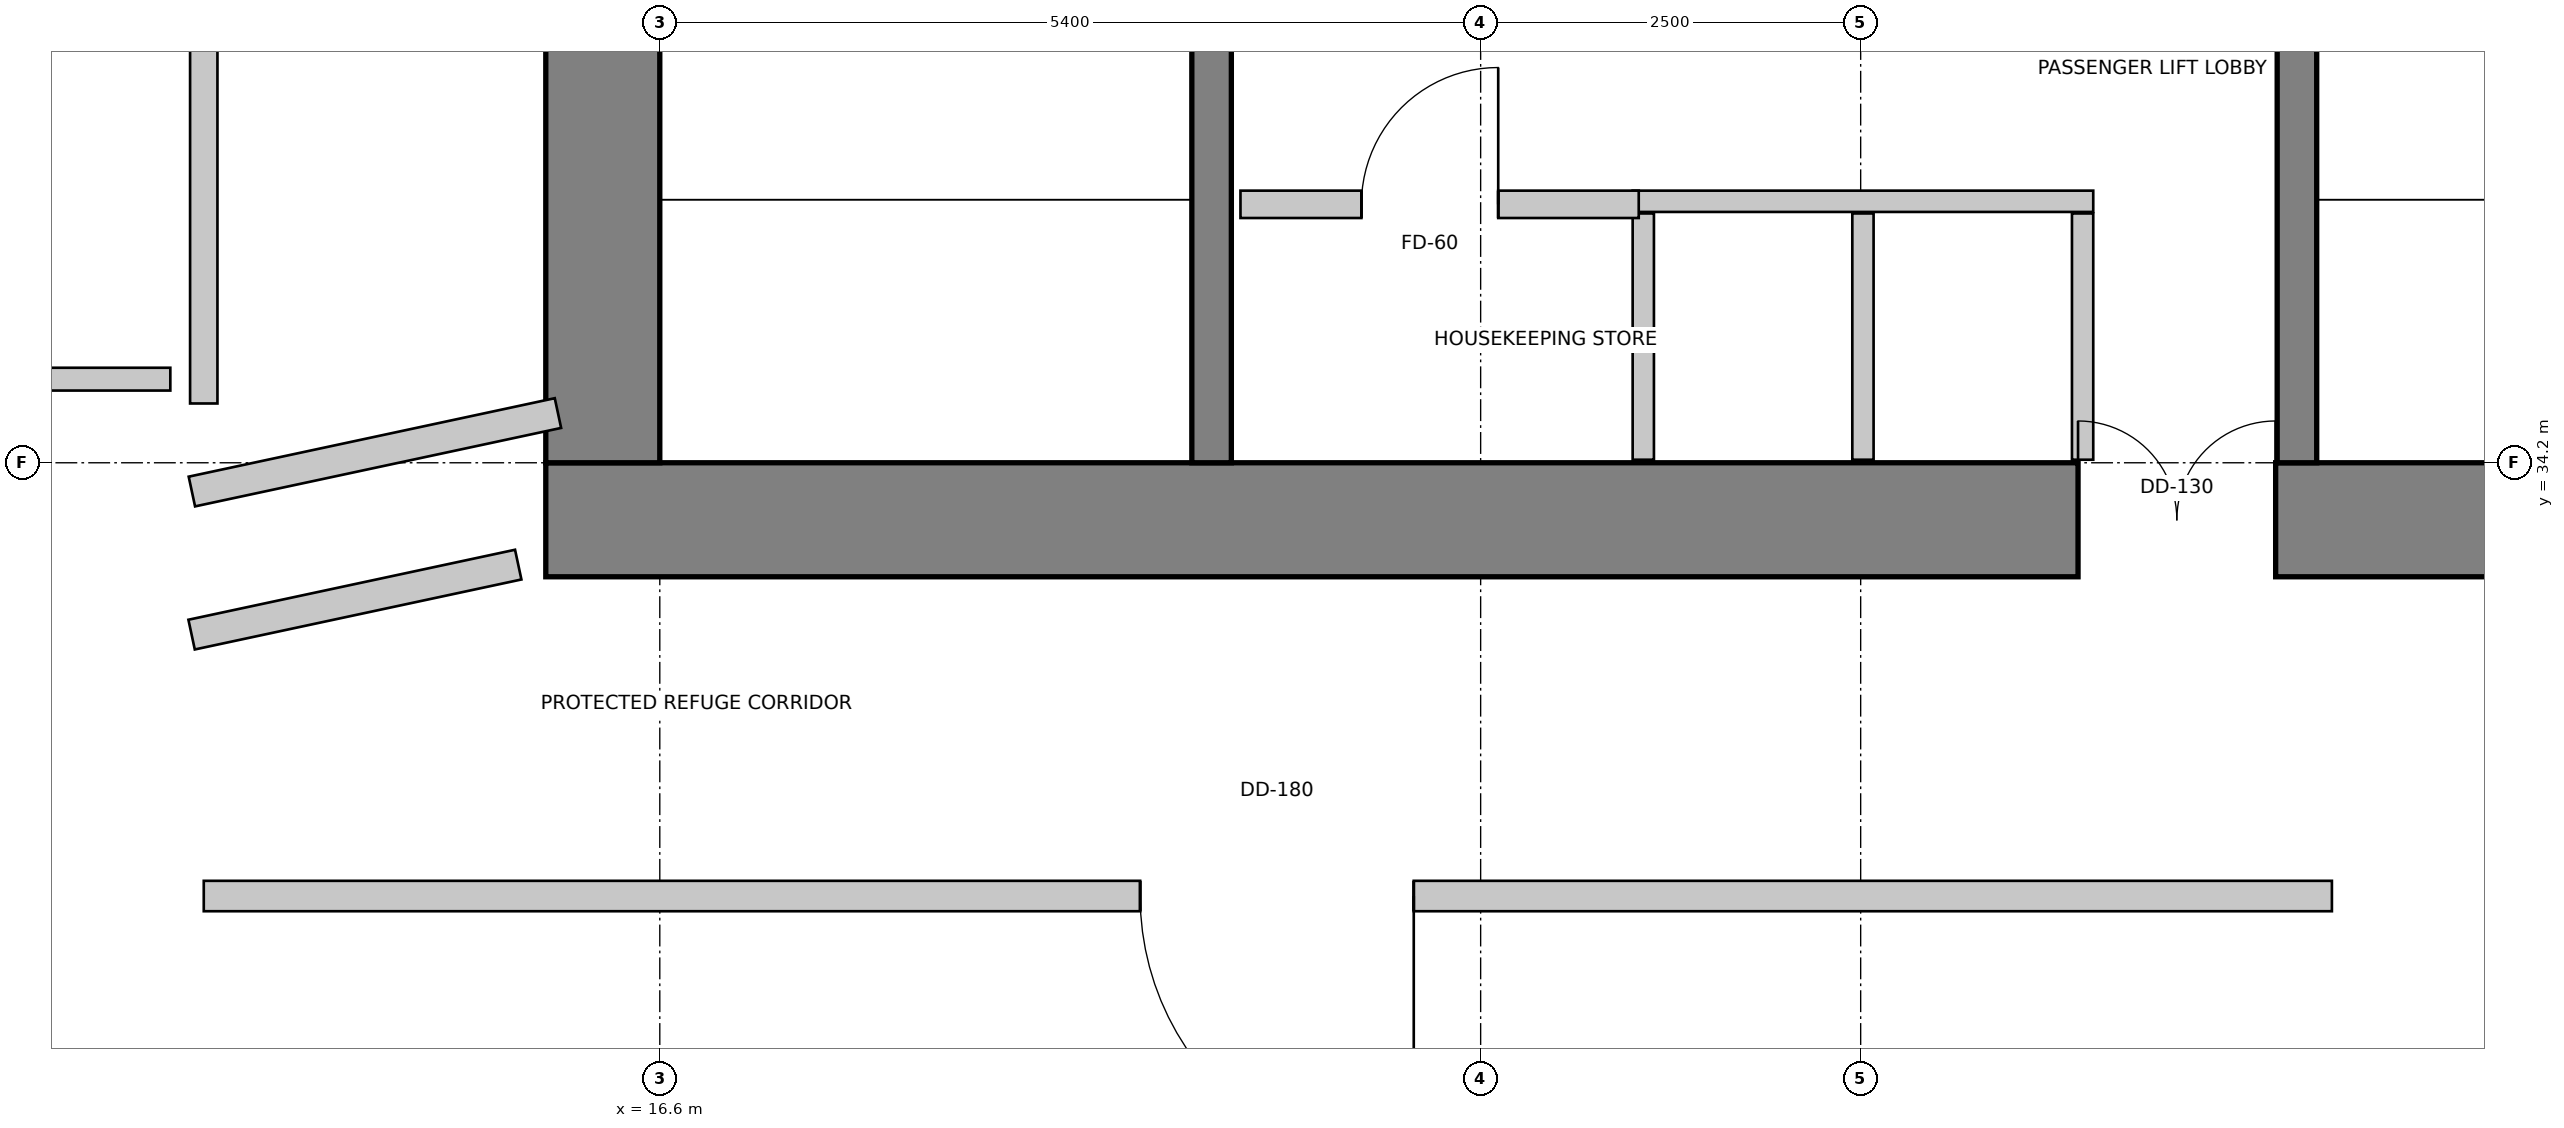
"""IFC4 building model, lengths in metres.
Left out: names, types, materials, properties, quantities, classifications, styles, units other than length and angle.
Written with IfcOpenShell. Run it as: python <this file> out.ifc"""

import sys

from ifc_helpers import new_model, si_unit, direction, frame, frame_2d, origin, place, context, subcontext, project, spatial, rectangle, extrude, source, transform, mapped, element, fill, save


model = new_model("IFC4")
c1 = context("Model", 3, precision=1e-05, world=origin(), true_north=direction((0.0, 1.0)))
c2 = subcontext(c1, "Body", "Model", "MODEL_VIEW")
j1 = project(units=[si_unit("LENGTHUNIT", "METRE"), si_unit("PLANEANGLEUNIT", "RADIAN")], contexts=[c1])
p1 = place(None, origin())
s1 = spatial("IfcSite", under=j1, at=p1, CompositionType="ELEMENT")
p2 = place(p1, origin())
s2 = spatial("IfcBuilding", under=s1, at=p2, CompositionType="ELEMENT")
p3 = place(p2, frame((0.0, 0.0, 171.8)))
s3 = spatial("IfcBuildingStorey", under=s2, at=p3, CompositionType="ELEMENT", Elevation=171.8)
p4 = place(p3, frame((15.85, 33.825, 0.0), z_axis=(0.0, 0.0, 1.0), x_axis=(1.0, 0.0, 0.0)))
e1 = element("IfcWall", 1, at=p4, inside=s3, PredefinedType="SHEAR", context=c2, shape_type="SweptSolid", body=[
    extrude(rectangle(XDim=15.9, YDim=0.75, at=frame_2d((7.95, 0.0))), origin(), (0.0, 0.0, 1.0), 6.4),
])
m1 = source(origin(), c2, "Body", "SweptSolid", [
    extrude(rectangle(XDim=1.3, YDim=2.15, at=frame_2d((0.65, 1.075))), frame((0.0, 0.385, 0.0), z_axis=(0.0, -1.0, 0.0), x_axis=(1.0, 0.0, 0.0)), (0.0, 0.0, 1.0), 0.77),
])
p5 = place(p4, frame((10.08, 0.0, 0.0)))
e2 = element("IfcOpeningElement", 2, at=p5, cuts=e1, PredefinedType="OPENING", context=c2, shape_type="MappedRepresentation", body=[
    mapped(m1, transform((0.0, 0.0, 0.0), scale=1.0)),
])
p6 = place(p3, frame((16.225, 34.2, 0.0), z_axis=(0.0, 0.0, 1.0), x_axis=(0.0, 1.0, 0.0)))
e3 = element("IfcWall", 3, at=p6, inside=s3, PredefinedType="SHEAR", context=c2, shape_type="SweptSolid", body=[
    extrude(rectangle(XDim=11.4, YDim=0.75, at=frame_2d((5.7, 0.0))), origin(), (0.0, 0.0, 1.0), 6.4),
])
m2 = source(origin(), c2, "Body", "SweptSolid", [
    extrude(rectangle(XDim=1.1, YDim=2.15, at=frame_2d((0.55, 1.075))), frame((0.0, 0.385, 0.0), z_axis=(0.0, -1.0, 0.0), x_axis=(1.0, 0.0, 0.0)), (0.0, 0.0, 1.0), 0.77),
])
p7 = place(p6, frame((7.15, 0.0, 0.0)))
e4 = element("IfcOpeningElement", 4, at=p7, cuts=e3, PredefinedType="OPENING", context=c2, shape_type="MappedRepresentation", body=[
    mapped(m2, transform((0.0, 0.0, 0.0), scale=1.0)),
])
p8 = place(p3, frame((20.23, 34.2, 0.0), z_axis=(0.0, 0.0, 1.0), x_axis=(0.0, 1.0, 0.0)))
e5 = element("IfcWall", 5, at=p8, inside=s3, PredefinedType="SHEAR", context=c2, shape_type="SweptSolid", body=[
    extrude(rectangle(XDim=9.06, YDim=0.26, at=frame_2d((4.53, 0.0))), origin(), (0.0, 0.0, 1.0), 6.4),
])
m3 = source(origin(), c2, "Body", "SweptSolid", [
    extrude(rectangle(XDim=1.1, YDim=2.15, at=frame_2d((0.55, 1.075))), frame((0.0, 0.14, 0.0), z_axis=(0.0, -1.0, 0.0), x_axis=(1.0, 0.0, 0.0)), (0.0, 0.0, 1.0), 0.28),
])
p9 = place(p8, frame((7.45, 0.0, 0.0)))
e6 = element("IfcOpeningElement", 6, at=p9, cuts=e5, PredefinedType="OPENING", context=c2, shape_type="MappedRepresentation", body=[
    mapped(m3, transform((0.0, 0.0, 0.0), scale=1.0)),
])
p10 = place(p3, frame((27.37, 34.2, 0.0), z_axis=(0.0, 0.0, 1.0), x_axis=(0.0, 1.0, 0.0)))
e7 = element("IfcWall", 7, at=p10, inside=s3, PredefinedType="SHEAR", context=c2, shape_type="SweptSolid", body=[
    extrude(rectangle(XDim=9.06, YDim=0.26, at=frame_2d((4.53, 0.0))), origin(), (0.0, 0.0, 1.0), 6.4),
])
p11 = place(p10, frame((7.45, 0.0, 0.0)))
e8 = element("IfcOpeningElement", 8, at=p11, cuts=e7, PredefinedType="OPENING", context=c2, shape_type="MappedRepresentation", body=[
    mapped(m3, transform((0.0, 0.0, 0.0), scale=1.0)),
])
p12 = place(p3, frame((28.084, 28.76, 0.0), z_axis=(0.0, 0.0, 1.0), x_axis=(0.707106781187, 0.707106781187, 0.0)))
e9 = element("IfcWall", 9, at=p12, inside=s3, PredefinedType="PARAPET", context=c2, shape_type="SweptSolid", body=[
    extrude(rectangle(XDim=2.653, YDim=0.22, at=frame_2d((1.326, 0.0))), origin(), (0.0, 0.0, 1.0), 1.1),
])
p13 = place(p3, frame((13.277, 47.16, 0.0), z_axis=(0.0, 0.0, 1.0), x_axis=(-0.31991959002, -0.947444698081, 0.0)))
e10 = element("IfcWall", 10, at=p13, inside=s3, PredefinedType="PARAPET", context=c2, shape_type="SweptSolid", body=[
    extrude(rectangle(XDim=15.861, YDim=0.22, at=frame_2d((7.93, 0.0))), origin(), (0.0, 0.0, 1.0), 1.1),
])
p14 = place(p3, frame((23.0, 35.92, 0.0), z_axis=(0.0, 0.0, 1.0), x_axis=(1.0, 0.0, 0.0)))
e11 = element("IfcWall", 11, at=p14, inside=s3, PredefinedType="SOLIDWALL", context=c2, shape_type="SweptSolid", body=[
    extrude(rectangle(XDim=3.03, YDim=0.14, at=frame_2d((1.515, 0.0))), origin(), (0.0, 0.0, 1.0), 6.1),
])
for number, where, z_axis, x_axis in (
    (12, (25.96, 34.22, 0.0), (0.0, 0.0, 1.0), (0.0, 1.0, 0.0)),
    (13, (23.07, 34.22, 0.0), (0.0, 0.0, 1.0), (0.0, 1.0, 0.0)),
    (14, (24.515, 34.22, 0.0), (0.0, 0.0, 1.0), (0.0, 1.0, 0.0)),
):
    element("IfcWall", number, at=place(p3, frame(where, z_axis=z_axis, x_axis=x_axis)), inside=s3, PredefinedType="SOLIDWALL", context=c2, shape_type="SweptSolid", body=[
        extrude(rectangle(XDim=1.62, YDim=0.14, at=frame_2d((0.81, 0.0))), origin(), (0.0, 0.0, 1.0), 5.392),
    ])
p15 = place(p3, frame((20.42, 35.9, 0.0), z_axis=(0.0, 0.0, 1.0), x_axis=(1.0, 0.0, 0.0)))
e15 = element("IfcWall", 15, at=p15, inside=s3, PredefinedType="PARTITIONING", context=c2, shape_type="SweptSolid", body=[
    extrude(rectangle(XDim=2.62, YDim=0.18, at=frame_2d((1.31, 0.0))), origin(), (0.0, 0.0, 1.0), 6.1),
])
m4 = source(origin(), c2, "Body", "SweptSolid", [
    extrude(rectangle(XDim=0.9, YDim=2.15, at=frame_2d((0.45, 1.075))), frame((0.0, 0.1, 0.0), z_axis=(0.0, -1.0, 0.0), x_axis=(1.0, 0.0, 0.0)), (0.0, 0.0, 1.0), 0.2),
])
p16 = place(p15, frame((0.796, 0.0, 0.0)))
e16 = element("IfcOpeningElement", 16, at=p16, cuts=e15, PredefinedType="OPENING", context=c2, shape_type="MappedRepresentation", body=[
    mapped(m4, transform((0.0, 0.0, 0.0), scale=1.0)),
])
p17 = place(p3, frame((27.6, 31.35, 0.0), z_axis=(0.0, 0.0, 1.0), x_axis=(-1.0, 0.0, 0.0)))
e17 = element("IfcWall", 17, at=p17, inside=s3, PredefinedType="SOLIDWALL", context=c2, shape_type="SweptSolid", body=[
    extrude(rectangle(XDim=14.0, YDim=0.2, at=frame_2d((7.0, 0.0))), origin(), (0.0, 0.0, 1.0), 5.769),
])
m5 = source(origin(), c2, "Body", "SweptSolid", [
    extrude(rectangle(XDim=1.8, YDim=2.15, at=frame_2d((0.9, 1.075))), frame((0.0, 0.11, 0.0), z_axis=(0.0, -1.0, 0.0), x_axis=(1.0, 0.0, 0.0)), (0.0, 0.0, 1.0), 0.22),
])
p18 = place(p17, frame((6.04, 0.0, 0.0)))
e18 = element("IfcOpeningElement", 18, at=p18, cuts=e17, PredefinedType="OPENING", context=c2, shape_type="MappedRepresentation", body=[
    mapped(m5, transform((0.0, 0.0, 0.0), scale=1.0)),
])
p19 = place(p3, frame((13.6, 34.59, 0.0), z_axis=(0.0, 0.0, 1.0), x_axis=(0.0, 1.0, 0.0)))
e19 = element("IfcWall", 19, at=p19, inside=s3, PredefinedType="PARTITIONING", context=c2, shape_type="SweptSolid", body=[
    extrude(rectangle(XDim=5.58, YDim=0.18, at=frame_2d((2.79, 0.0))), origin(), (0.0, 0.0, 1.0), 5.242),
])
m6 = source(origin(), c2, "Body", "SweptSolid", [
    extrude(rectangle(XDim=0.85, YDim=2.15, at=frame_2d((0.425, 1.075))), frame((0.0, 0.1, 0.0), z_axis=(0.0, -1.0, 0.0), x_axis=(1.0, 0.0, 0.0)), (0.0, 0.0, 1.0), 0.2),
])
p20 = place(p19, frame((2.365, 0.0, 0.0)))
e20 = element("IfcOpeningElement", 20, at=p20, cuts=e19, PredefinedType="OPENING", context=c2, shape_type="MappedRepresentation", body=[
    mapped(m6, transform((0.0, 0.0, 0.0), scale=1.0)),
])
p21 = place(p3, frame((13.38, 34.75, 0.0), z_axis=(0.0, 0.0, 1.0), x_axis=(-1.0, 0.0, 0.0)))
e21 = element("IfcWall", 21, at=p21, inside=s3, PredefinedType="PARTITIONING", context=c2, shape_type="SweptSolid", body=[
    extrude(rectangle(XDim=3.939, YDim=0.15, at=frame_2d((1.97, 0.0))), origin(), (0.0, 0.0, 1.0), 5.242),
])
p22 = place(p3, frame((13.522, 34.011, 0.0), z_axis=(0.0, 0.0, 1.0), x_axis=(0.9777966111, 0.209556167464, 0.0)))
e22 = element("IfcWall", 22, at=p22, inside=s3, PredefinedType="SOLIDWALL", context=c2, shape_type="SweptSolid", body=[
    extrude(rectangle(XDim=2.463, YDim=0.2, at=frame_2d((1.231, 0.0))), origin(), (0.0, 0.0, 1.0), 6.1),
])
p23 = place(p3, frame((15.669, 33.53, 0.0), z_axis=(0.0, 0.0, 1.0), x_axis=(-0.977800788178, -0.209536676117, 0.0)))
e23 = element("IfcWall", 23, at=p23, inside=s3, PredefinedType="SOLIDWALL", context=c2, shape_type="SweptSolid", body=[
    extrude(rectangle(XDim=2.198, YDim=0.2, at=frame_2d((1.099, 0.0))), origin(), (0.0, 0.0, 1.0), 6.1),
])
m7 = source(origin(), c2, "Body", "SweptSolid", [
    extrude(rectangle(XDim=1.3, YDim=2.15, at=frame_2d((0.65, 1.075))), frame((0.0, 0.025, 0.0), z_axis=(0.0, -1.0, 0.0), x_axis=(1.0, 0.0, 0.0)), (0.0, 0.0, 1.0), 0.05),
])
p24 = place(p5, origin())
e24 = element("IfcDoor", 24, at=p24, inside=s3, OperationType="DOUBLE_DOOR_SINGLE_SWING", PredefinedType="DOOR", context=c2, shape_type="MappedRepresentation", body=[
    mapped(m7, transform((0.0, 0.0, 0.0), scale=1.0)),
])
fill(e2, e24)
m8 = source(origin(), c2, "Body", "SweptSolid", [
    extrude(rectangle(XDim=0.9, YDim=2.15, at=frame_2d((0.45, 1.075))), frame((0.0, 0.025, 0.0), z_axis=(0.0, -1.0, 0.0), x_axis=(1.0, 0.0, 0.0)), (0.0, 0.0, 1.0), 0.05),
])
p25 = place(p16, origin())
e25 = element("IfcDoor", 25, at=p25, inside=s3, OperationType="SINGLE_SWING_RIGHT", PredefinedType="DOOR", context=c2, shape_type="MappedRepresentation", body=[
    mapped(m8, transform((0.0, 0.0, 0.0), scale=1.0)),
])
fill(e16, e25)
m9 = source(origin(), c2, "Body", "SweptSolid", [
    extrude(rectangle(XDim=1.8, YDim=2.15, at=frame_2d((0.9, 1.075))), frame((0.0, 0.025, 0.0), z_axis=(0.0, -1.0, 0.0), x_axis=(1.0, 0.0, 0.0)), (0.0, 0.0, 1.0), 0.05),
])
p26 = place(p18, origin())
e26 = element("IfcDoor", 26, at=p26, inside=s3, OperationType="SINGLE_SWING_LEFT", PredefinedType="DOOR", context=c2, shape_type="MappedRepresentation", body=[
    mapped(m9, transform((0.0, 0.0, 0.0), scale=1.0)),
])
fill(e18, e26)
save(model, sys.argv[1])
